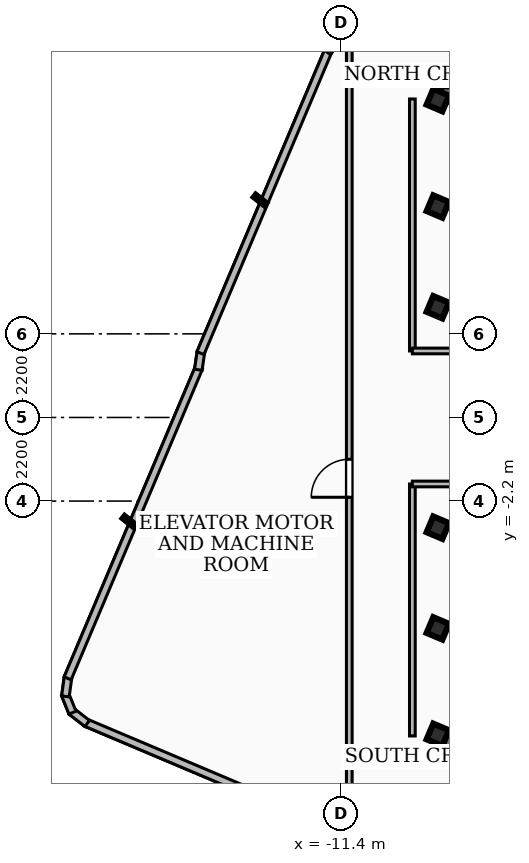
"""IFC4 building model, lengths in metres.
Left out: names, types, materials, properties, quantities, classifications, styles, units other than length and angle.
Written with IfcOpenShell. Run it as: python <this file> out.ifc"""

import sys

from ifc_helpers import new_model, si_unit, direction, frame, frame_2d, origin, origin_2d, place, context, subcontext, project, spatial, rectangle, hollow_rectangle, extrude, element, fill, save


model = new_model("IFC4")
c1 = context("Model", 3, precision=1e-05, world=origin(), true_north=direction((0.0, 1.0)))
c2 = subcontext(c1, "Body", "Model", "MODEL_VIEW")
j1 = project(units=[si_unit("LENGTHUNIT", "METRE"), si_unit("PLANEANGLEUNIT", "RADIAN")], contexts=[c1])
p1 = place(None, origin())
s1 = spatial("IfcSite", under=j1, at=p1, CompositionType="ELEMENT")
p2 = place(p1, origin())
s2 = spatial("IfcBuilding", under=s1, at=p2, CompositionType="ELEMENT")
p3 = place(p2, frame((0.0, 0.0, 301.68)))
s3 = spatial("IfcBuildingStorey", under=s2, at=p3, CompositionType="ELEMENT", Elevation=301.68)
for number, where, z_axis, x_axis in (
    (1, (-8.78, 8.51, 0.0), (0.0, 0.0, 1.0), (1.0, 0.0, 0.0)),
    (2, (8.78, -8.51, 0.0), (0.0, 0.0, 1.0), (-1.0, 0.0, 0.0)),
):
    element("IfcWall", number, at=place(p3, frame(where, z_axis=z_axis, x_axis=x_axis)), inside=s3, PredefinedType="SHEAR", context=c2, shape_type="SweptSolid", body=[
        extrude(rectangle(XDim=17.56, YDim=0.4, at=frame_2d((8.78, 0.0))), origin(), (0.0, 0.0, 1.0), 3.89),
    ])
for number, where, z_axis, x_axis in (
    (3, (-8.85, -5.55, 0.0), (0.0, 0.0, 1.0), (0.389, 0.921, 0.0)),
    (4, (-8.85, -2.9, 0.0), (0.0, 0.0, 1.0), (0.389, 0.921, 0.0)),
    (5, (-8.85, 2.9, 0.0), (0.0, 0.0, 1.0), (0.389, 0.921, 0.0)),
    (6, (-8.85, 5.55, 0.0), (0.0, 0.0, 1.0), (0.389, 0.921, 0.0)),
    (7, (-8.85, 8.35, 0.0), (0.0, 0.0, 1.0), (0.389, 0.921, 0.0)),
    (8, (-8.85, -8.35, 0.0), (0.0, 0.0, 1.0), (0.389, 0.921, 0.0)),
):
    element("IfcColumn", number, at=place(p3, frame(where, z_axis=z_axis, x_axis=x_axis)), inside=s3, PredefinedType="COLUMN", context=c2, shape_type="SweptSolid", body=[
        extrude(hollow_rectangle(XDim=0.45, YDim=0.45, WallThickness=0.022, at=origin_2d()), origin(), (0.0, 0.0, 1.0), 4.14),
    ])
p4 = place(p3, frame((6.864, -18.591, 0.0), z_axis=(0.0, 0.0, 1.0), x_axis=(-0.921043011302, 0.389460872658, 0.0)))
e9 = element("IfcWall", 9, at=p4, inside=s3, PredefinedType="SOLIDWALL", context=c2, shape_type="SweptSolid", body=[
    extrude(rectangle(XDim=27.125, YDim=0.2, at=frame_2d((13.562, 0.0))), origin(), (0.0, 0.0, 1.0), 3.89),
])
p5 = place(p3, frame((-18.076, -8.052, 0.0), z_axis=(0.0, 0.0, 1.0), x_axis=(-0.789876089069, 0.613266470563, 0.0)))
e10 = element("IfcWall", 10, at=p5, inside=s3, PredefinedType="SOLIDWALL", context=c2, shape_type="SweptSolid", body=[
    extrude(rectangle(XDim=0.527, YDim=0.2, at=frame_2d((0.263, 0.0))), origin(), (0.0, 0.0, 1.0), 3.89),
])
p6 = place(p3, frame((-18.463, -7.767, 0.0), z_axis=(0.0, 0.0, 1.0), x_axis=(-0.375892621934, 0.926663227271, 0.0)))
e11 = element("IfcWall", 11, at=p6, inside=s3, PredefinedType="SOLIDWALL", context=c2, shape_type="SweptSolid", body=[
    extrude(rectangle(XDim=0.514, YDim=0.2, at=frame_2d((0.257, 0.0))), origin(), (0.0, 0.0, 1.0), 3.89),
])
p7 = place(p3, frame((-18.65, -7.339, 0.0), z_axis=(0.0, 0.0, 1.0), x_axis=(0.136371462064, 0.99065777357, 0.0)))
e12 = element("IfcWall", 12, at=p7, inside=s3, PredefinedType="SOLIDWALL", context=c2, shape_type="SweptSolid", body=[
    extrude(rectangle(XDim=0.528, YDim=0.2, at=frame_2d((0.264, 0.0))), origin(), (0.0, 0.0, 1.0), 3.89),
])
p8 = place(p3, frame((-18.591, -6.864, 0.0), z_axis=(0.0, 0.0, 1.0), x_axis=(0.389435189284, 0.921053871035, 0.0)))
e13 = element("IfcWall", 13, at=p8, inside=s3, PredefinedType="SOLIDWALL", context=c2, shape_type="SweptSolid", body=[
    extrude(rectangle(XDim=8.867, YDim=0.2, at=frame_2d((4.434, 0.0))), origin(), (0.0, 0.0, 1.0), 3.89),
])
p9 = place(p3, frame((-15.152, 1.255, 0.0), z_axis=(0.0, 0.0, 1.0), x_axis=(0.142673990232, 0.989769737116, 0.0)))
e14 = element("IfcWall", 14, at=p9, inside=s3, PredefinedType="SOLIDWALL", context=c2, shape_type="SweptSolid", body=[
    extrude(rectangle(XDim=0.491, YDim=0.2, at=frame_2d((0.246, 0.0))), origin(), (0.0, 0.0, 1.0), 3.89),
])
p10 = place(p3, frame((-15.096, 1.693, 0.0), z_axis=(0.0, 0.0, 1.0), x_axis=(0.389467605067, 0.92104016449, 0.0)))
e15 = element("IfcWall", 15, at=p10, inside=s3, PredefinedType="SOLIDWALL", context=c2, shape_type="SweptSolid", body=[
    extrude(rectangle(XDim=8.64, YDim=0.2, at=frame_2d((4.32, 0.0))), origin(), (0.0, 0.0, 1.0), 3.89),
])
p11 = place(p3, frame((-11.756, 9.608, 0.0), z_axis=(0.0, 0.0, 1.0), x_axis=(0.61252495827, 0.79045124802, 0.0)))
e16 = element("IfcWall", 16, at=p11, inside=s3, PredefinedType="SOLIDWALL", context=c2, shape_type="SweptSolid", body=[
    extrude(rectangle(XDim=0.49, YDim=0.2, at=frame_2d((0.245, 0.0))), origin(), (0.0, 0.0, 1.0), 3.89),
])
p12 = place(p3, frame((-9.52, 1.75, 0.0), z_axis=(0.0, 0.0, 1.0), x_axis=(0.0, 1.0, 0.0)))
e17 = element("IfcWall", 17, at=p12, inside=s3, PredefinedType="PARTITIONING", context=c2, shape_type="SweptSolid", body=[
    extrude(rectangle(XDim=6.63, YDim=0.15, at=frame_2d((3.315, 0.0))), origin(), (0.0, 0.0, 1.0), 3.26),
])
p13 = place(p3, frame((-7.85, 1.75, 0.0), z_axis=(0.0, 0.0, 1.0), x_axis=(-1.0, 0.0, 0.0)))
e18 = element("IfcWall", 18, at=p13, inside=s3, PredefinedType="PARTITIONING", context=c2, shape_type="SweptSolid", body=[
    extrude(rectangle(XDim=1.67, YDim=0.15, at=frame_2d((0.835, 0.0))), origin(), (0.0, 0.0, 1.0), 3.26),
])
p14 = place(p3, frame((-9.52, -8.38, 0.0), z_axis=(0.0, 0.0, 1.0), x_axis=(0.0, 1.0, 0.0)))
e19 = element("IfcWall", 19, at=p14, inside=s3, PredefinedType="PARTITIONING", context=c2, shape_type="SweptSolid", body=[
    extrude(rectangle(XDim=6.63, YDim=0.15, at=frame_2d((3.315, 0.0))), origin(), (0.0, 0.0, 1.0), 3.89),
])
p15 = place(p3, frame((-7.85, -1.75, 0.0), z_axis=(0.0, 0.0, 1.0), x_axis=(-1.0, 0.0, 0.0)))
e20 = element("IfcWall", 20, at=p15, inside=s3, PredefinedType="PARTITIONING", context=c2, shape_type="SweptSolid", body=[
    extrude(rectangle(XDim=1.67, YDim=0.15, at=frame_2d((0.835, 0.0))), origin(), (0.0, 0.0, 1.0), 3.27),
])
p16 = place(p3, frame((-11.18, -10.891, 0.0), z_axis=(0.0, 0.0, 1.0), x_axis=(0.0, 1.0, 0.0)))
e21 = element("IfcWall", 21, at=p16, inside=s3, PredefinedType="PARTITIONING", context=c2, shape_type="SweptSolid", body=[
    extrude(rectangle(XDim=21.387, YDim=0.15, at=frame_2d((10.694, 0.0))), origin(), (0.0, 0.0, 1.0), 3.26),
])
p17 = place(p16, frame((8.791, 0.0, 0.0)))
e22 = element("IfcOpeningElement", 22, at=p17, cuts=e21, PredefinedType="OPENING", context=c2, shape_type="SweptSolid", body=[
    extrude(rectangle(XDim=1.0, YDim=2.1, at=frame_2d((0.5, 1.05))), frame((0.0, 0.085, 0.0), z_axis=(0.0, -1.0, 0.0), x_axis=(1.0, 0.0, 0.0)), (0.0, 0.0, 1.0), 0.17),
])
p18 = place(p17, origin())
e23 = element("IfcDoor", 23, at=p18, inside=s3, OperationType="SINGLE_SWING_LEFT", PredefinedType="DOOR", context=c2, shape_type="SweptSolid", body=[
    extrude(rectangle(XDim=1.0, YDim=2.1, at=frame_2d((0.5, 1.05))), frame((0.0, 0.025, 0.0), z_axis=(0.0, -1.0, 0.0), x_axis=(1.0, 0.0, 0.0)), (0.0, 0.0, 1.0), 0.05),
])
fill(e22, e23)
save(model, sys.argv[1])
